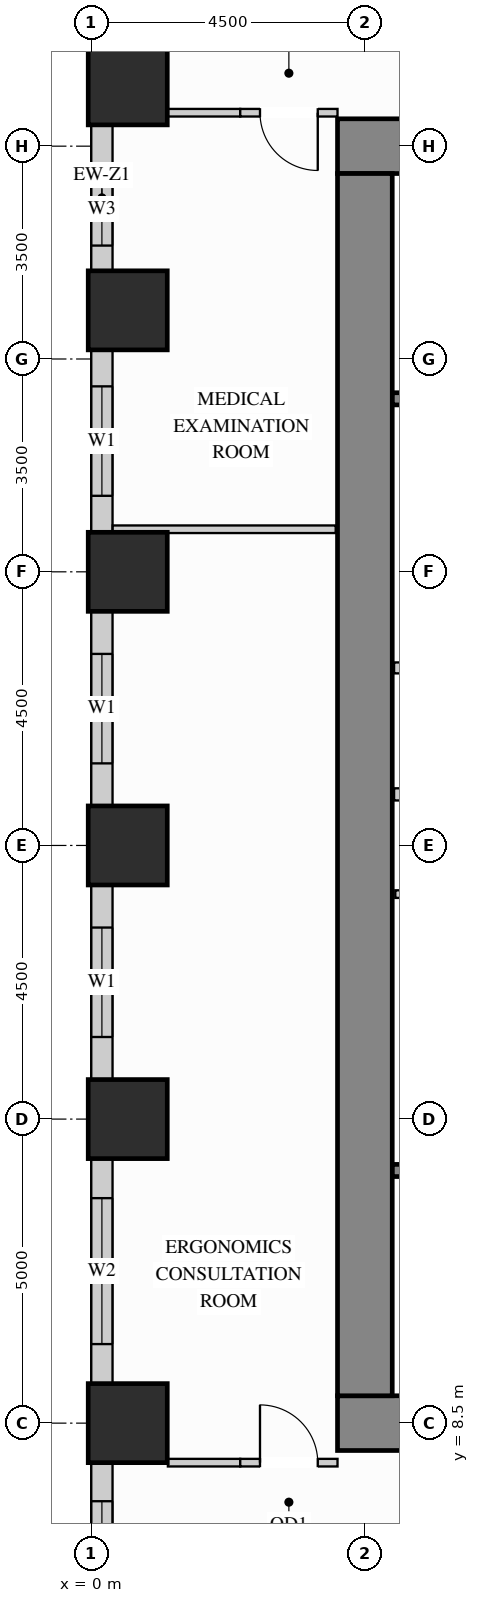
"""IFC4 building model, lengths in metres.
Left out: names, types, materials, properties, quantities, classifications, styles, units other than length and angle.
Written with IfcOpenShell. Run it as: python <this file> out.ifc"""

import sys

from ifc_helpers import new_model, si_unit, direction, frame, frame_2d, origin, origin_2d, place, context, subcontext, project, spatial, rectangle, extrude, source, transform, mapped, element, fill, save


model = new_model("IFC4")
c1 = context("Model", 3, precision=1e-05, world=origin(), true_north=direction((0.0, 1.0)))
c2 = subcontext(c1, "Body", "Model", "MODEL_VIEW")
j1 = project(units=[si_unit("LENGTHUNIT", "METRE"), si_unit("PLANEANGLEUNIT", "RADIAN")], contexts=[c1])
p1 = place(None, origin())
s1 = spatial("IfcSite", under=j1, at=p1, CompositionType="ELEMENT")
p2 = place(p1, origin())
s2 = spatial("IfcBuilding", under=s1, at=p2, CompositionType="ELEMENT")
p3 = place(p2, frame((0.0, 0.0, 33.3)))
s3 = spatial("IfcBuildingStorey", under=s2, at=p3, CompositionType="ELEMENT", Elevation=33.3)
m1 = source(origin(), c2, "Body", "SweptSolid", [
    extrude(rectangle(XDim=1.3, YDim=1.3, at=origin_2d()), origin(), (0.0, 0.0, 1.0), 3.38),
])
for number, where, z_axis, x_axis in (
    (1, (0.6, 13.5, 0.0), (0.0, 0.0, 1.0), (1.0, 0.0, 0.0)),
    (2, (0.6, 18.0, 0.0), (0.0, 0.0, 1.0), (1.0, 0.0, 0.0)),
    (3, (0.6, 22.5, 0.0), (0.0, 0.0, 1.0), (1.0, 0.0, 0.0)),
    (4, (0.6, 26.8, 0.0), (0.0, 0.0, 1.0), (1.0, 0.0, 0.0)),
    (5, (0.6, 30.5, 0.0), (0.0, 0.0, 1.0), (1.0, 0.0, 0.0)),
    (6, (0.6, 8.5, 0.0), (0.0, 0.0, 1.0), (1.0, 0.0, 0.0)),
):
    element("IfcColumn", number, at=place(p3, frame(where, z_axis=z_axis, x_axis=x_axis)), inside=s3, PredefinedType="COLUMN", context=c2, shape_type="MappedRepresentation", body=[
        mapped(m1, transform((0.0, 0.0, 0.0), x_axis=(1.0, 0.0, 0.0), y_axis=(0.0, 1.0, 0.0), z_axis=(0.0, 0.0, 1.0))),
    ])
m2 = source(origin(), c2, "Body", "SweptSolid", [
    extrude(rectangle(XDim=10.9, YDim=0.9, at=frame_2d((5.45, 0.0))), origin(), (0.0, 0.0, 1.0), 3.38),
])
for number, where, z_axis, x_axis in (
    (7, (4.05, 29.5, 0.0), (0.0, 0.0, 1.0), (1.0, 0.0, 0.0)),
    (8, (4.05, 8.5, 0.0), (0.0, 0.0, 1.0), (1.0, 0.0, 0.0)),
):
    element("IfcWall", number, at=place(p3, frame(where, z_axis=z_axis, x_axis=x_axis)), inside=s3, PredefinedType="SHEAR", context=c2, shape_type="MappedRepresentation", body=[
        mapped(m2, transform((0.0, 0.0, 0.0), x_axis=(1.0, 0.0, 0.0), y_axis=(0.0, 1.0, 0.0), z_axis=(0.0, 0.0, 1.0))),
    ])
m3 = source(origin(), c2, "Body", "SweptSolid", [
    extrude(rectangle(XDim=20.1, YDim=0.9, at=frame_2d((10.05, 0.0))), origin(), (0.0, 0.0, 1.0), 3.38),
])
p4 = place(p3, frame((4.5, 8.95, 0.0), z_axis=(0.0, 0.0, 1.0), x_axis=(0.0, 1.0, 0.0)))
e9 = element("IfcWall", 9, at=p4, inside=s3, PredefinedType="SHEAR", context=c2, shape_type="MappedRepresentation", body=[
    mapped(m3, transform((0.0, 0.0, 0.0), x_axis=(1.0, 0.0, 0.0), y_axis=(0.0, 1.0, 0.0), z_axis=(0.0, 0.0, 1.0))),
])
p5 = place(p3, frame((0.175, 29.852, 0.0), z_axis=(0.0, 0.0, 1.0), x_axis=(0.0, -1.0, 0.0)))
e10 = element("IfcWall", 10, at=p5, inside=s3, PredefinedType="SOLIDWALL", context=c2, shape_type="SweptSolid", body=[
    extrude(rectangle(XDim=2.404, YDim=0.35, at=frame_2d((1.202, 0.0))), origin(), (0.0, 0.0, 1.0), 2.51),
])
p6 = place(p5, frame((0.787, 0.0, 0.78)))
e11 = element("IfcOpeningElement", 11, at=p6, cuts=e10, PredefinedType="OPENING", context=c2, shape_type="SweptSolid", body=[
    extrude(rectangle(XDim=1.2, YDim=1.55, at=frame_2d((0.6, 0.775))), frame((0.0, 0.185, 0.0), z_axis=(0.0, -1.0, 0.0), x_axis=(1.0, 0.0, 0.0)), (0.0, 0.0, 1.0), 0.37),
])
p7 = place(p3, frame((0.175, 26.152, 0.0), z_axis=(0.0, 0.0, 1.0), x_axis=(0.0, -1.0, 0.0)))
e12 = element("IfcWall", 12, at=p7, inside=s3, PredefinedType="SOLIDWALL", context=c2, shape_type="SweptSolid", body=[
    extrude(rectangle(XDim=3.004, YDim=0.35, at=frame_2d((1.502, 0.0))), origin(), (0.0, 0.0, 1.0), 2.51),
])
p8 = place(p7, frame((0.602, 0.0, 0.78)))
e13 = element("IfcOpeningElement", 13, at=p8, cuts=e12, PredefinedType="OPENING", context=c2, shape_type="SweptSolid", body=[
    extrude(rectangle(XDim=1.8, YDim=1.55, at=frame_2d((0.9, 0.775))), frame((0.0, 0.185, 0.0), z_axis=(0.0, -1.0, 0.0), x_axis=(1.0, 0.0, 0.0)), (0.0, 0.0, 1.0), 0.37),
])
p9 = place(p3, frame((0.175, 21.852, 0.0), z_axis=(0.0, 0.0, 1.0), x_axis=(0.0, -1.0, 0.0)))
e14 = element("IfcWall", 14, at=p9, inside=s3, PredefinedType="SOLIDWALL", context=c2, shape_type="SweptSolid", body=[
    extrude(rectangle(XDim=3.204, YDim=0.35, at=frame_2d((1.602, 0.0))), origin(), (0.0, 0.0, 1.0), 2.51),
])
p10 = place(p9, frame((0.702, 0.0, 0.78)))
e15 = element("IfcOpeningElement", 15, at=p10, cuts=e14, PredefinedType="OPENING", context=c2, shape_type="SweptSolid", body=[
    extrude(rectangle(XDim=1.8, YDim=1.55, at=frame_2d((0.9, 0.775))), frame((0.0, 0.185, 0.0), z_axis=(0.0, -1.0, 0.0), x_axis=(1.0, 0.0, 0.0)), (0.0, 0.0, 1.0), 0.37),
])
p11 = place(p3, frame((0.175, 17.352, 0.0), z_axis=(0.0, 0.0, 1.0), x_axis=(0.0, -1.0, 0.0)))
e16 = element("IfcWall", 16, at=p11, inside=s3, PredefinedType="SOLIDWALL", context=c2, shape_type="SweptSolid", body=[
    extrude(rectangle(XDim=3.204, YDim=0.35, at=frame_2d((1.602, 0.0))), origin(), (0.0, 0.0, 1.0), 2.51),
])
p12 = place(p11, frame((0.702, 0.0, 0.78)))
e17 = element("IfcOpeningElement", 17, at=p12, cuts=e16, PredefinedType="OPENING", context=c2, shape_type="SweptSolid", body=[
    extrude(rectangle(XDim=1.8, YDim=1.55, at=frame_2d((0.9, 0.775))), frame((0.0, 0.185, 0.0), z_axis=(0.0, -1.0, 0.0), x_axis=(1.0, 0.0, 0.0)), (0.0, 0.0, 1.0), 0.37),
])
p13 = place(p3, frame((0.175, 12.852, 0.0), z_axis=(0.0, 0.0, 1.0), x_axis=(0.0, -1.0, 0.0)))
e18 = element("IfcWall", 18, at=p13, inside=s3, PredefinedType="SOLIDWALL", context=c2, shape_type="SweptSolid", body=[
    extrude(rectangle(XDim=3.704, YDim=0.35, at=frame_2d((1.852, 0.0))), origin(), (0.0, 0.0, 1.0), 2.51),
])
p14 = place(p13, frame((0.652, 0.0, 0.78)))
e19 = element("IfcOpeningElement", 19, at=p14, cuts=e18, PredefinedType="OPENING", context=c2, shape_type="SweptSolid", body=[
    extrude(rectangle(XDim=2.4, YDim=1.55, at=frame_2d((1.2, 0.775))), frame((0.0, 0.185, 0.0), z_axis=(0.0, -1.0, 0.0), x_axis=(1.0, 0.0, 0.0)), (0.0, 0.0, 1.0), 0.37),
])
p15 = place(p3, frame((0.175, 7.852, 0.0), z_axis=(0.0, 0.0, 1.0), x_axis=(0.0, -1.0, 0.0)))
e20 = element("IfcWall", 20, at=p15, inside=s3, PredefinedType="SOLIDWALL", context=c2, shape_type="SweptSolid", body=[
    extrude(rectangle(XDim=3.704, YDim=0.35, at=frame_2d((1.852, 0.0))), origin(), (0.0, 0.0, 1.0), 2.51),
])
p16 = place(p15, frame((0.636, 0.0, 0.78)))
e21 = element("IfcOpeningElement", 21, at=p16, cuts=e20, PredefinedType="OPENING", context=c2, shape_type="SweptSolid", body=[
    extrude(rectangle(XDim=1.8, YDim=1.55, at=frame_2d((0.9, 0.775))), frame((0.0, 0.185, 0.0), z_axis=(0.0, -1.0, 0.0), x_axis=(1.0, 0.0, 0.0)), (0.0, 0.0, 1.0), 0.37),
])
m4 = source(origin(), c2, "Body", "SweptSolid", [
    extrude(rectangle(XDim=2.17, YDim=0.18, at=frame_2d((1.085, 0.0))), origin(), (0.0, 0.0, 1.0), 3.365),
])
p17 = place(p3, frame((4.98, 20.92, 0.0), z_axis=(0.0, 0.0, 1.0), x_axis=(1.0, 0.0, 0.0)))
e22 = element("IfcWall", 22, at=p17, inside=s3, PredefinedType="PARTITIONING", context=c2, shape_type="MappedRepresentation", body=[
    mapped(m4, transform((0.0, 0.0, 0.0), x_axis=(1.0, 0.0, 0.0), y_axis=(0.0, 1.0, 0.0), z_axis=(0.0, 0.0, 1.0))),
])
p18 = place(p3, frame((5.0, 17.2, 0.0), z_axis=(0.0, 0.0, 1.0), x_axis=(1.0, 0.0, 0.0)))
e23 = element("IfcWall", 23, at=p18, inside=s3, PredefinedType="PARTITIONING", context=c2, shape_type="SweptSolid", body=[
    extrude(rectangle(XDim=2.4, YDim=0.125, at=frame_2d((1.2, 0.0))), origin(), (0.0, 0.0, 1.0), 3.365),
])
p19 = place(p18, frame((0.7, 0.0, 0.0)))
e24 = element("IfcOpeningElement", 24, at=p19, cuts=e23, PredefinedType="OPENING", context=c2, shape_type="SweptSolid", body=[
    extrude(rectangle(XDim=0.85, YDim=2.1, at=frame_2d((0.425, 1.05))), frame((0.0, 0.073, 0.0), z_axis=(0.0, -1.0, 0.0), x_axis=(1.0, 0.0, 0.0)), (0.0, 0.0, 1.0), 0.145),
])
m5 = source(origin(), c2, "Body", "SweptSolid", [
    extrude(rectangle(XDim=1.19, YDim=0.125, at=frame_2d((0.595, 0.0))), origin(), (0.0, 0.0, 1.0), 3.365),
])
p20 = place(p3, frame((1.26, 30.05, 0.0), z_axis=(0.0, 0.0, 1.0), x_axis=(1.0, 0.0, 0.0)))
e25 = element("IfcWall", 25, at=p20, inside=s3, PredefinedType="PARTITIONING", context=c2, shape_type="MappedRepresentation", body=[
    mapped(m5, transform((0.0, 0.0, 0.0), x_axis=(1.0, 0.0, 0.0), y_axis=(0.0, 1.0, 0.0), z_axis=(0.0, 0.0, 1.0))),
])
p21 = place(p3, frame((2.45, 30.05, 0.0), z_axis=(0.0, 0.0, 1.0), x_axis=(1.0, 0.0, 0.0)))
e26 = element("IfcWall", 26, at=p21, inside=s3, PredefinedType="PARTITIONING", context=c2, shape_type="SweptSolid", body=[
    extrude(rectangle(XDim=1.6, YDim=0.125, at=frame_2d((0.8, 0.0))), origin(), (0.0, 0.0, 1.0), 3.365),
])
p22 = place(p21, frame((0.325, 0.0, 0.0)))
e27 = element("IfcOpeningElement", 27, at=p22, cuts=e26, PredefinedType="OPENING", context=c2, shape_type="SweptSolid", body=[
    extrude(rectangle(XDim=0.95, YDim=2.15, at=frame_2d((0.475, 1.075))), frame((0.0, 0.073, 0.0), z_axis=(0.0, -1.0, 0.0), x_axis=(1.0, 0.0, 0.0)), (0.0, 0.0, 1.0), 0.145),
])
p23 = place(p3, frame((1.26, 7.85, 0.0), z_axis=(0.0, 0.0, 1.0), x_axis=(1.0, 0.0, 0.0)))
e28 = element("IfcWall", 28, at=p23, inside=s3, PredefinedType="PARTITIONING", context=c2, shape_type="MappedRepresentation", body=[
    mapped(m5, transform((0.0, 0.0, 0.0), x_axis=(1.0, 0.0, 0.0), y_axis=(0.0, 1.0, 0.0), z_axis=(0.0, 0.0, 1.0))),
])
p24 = place(p3, frame((2.45, 7.85, 0.0), z_axis=(0.0, 0.0, 1.0), x_axis=(1.0, 0.0, 0.0)))
e29 = element("IfcWall", 29, at=p24, inside=s3, PredefinedType="PARTITIONING", context=c2, shape_type="SweptSolid", body=[
    extrude(rectangle(XDim=1.6, YDim=0.125, at=frame_2d((0.8, 0.0))), origin(), (0.0, 0.0, 1.0), 3.365),
])
p25 = place(p24, frame((0.325, 0.0, 0.0)))
e30 = element("IfcOpeningElement", 30, at=p25, cuts=e29, PredefinedType="OPENING", context=c2, shape_type="SweptSolid", body=[
    extrude(rectangle(XDim=0.95, YDim=2.15, at=frame_2d((0.475, 1.075))), frame((0.0, 0.073, 0.0), z_axis=(0.0, -1.0, 0.0), x_axis=(1.0, 0.0, 0.0)), (0.0, 0.0, 1.0), 0.145),
])
m6 = source(origin(), c2, "Body", "SweptSolid", [
    extrude(rectangle(XDim=3.668, YDim=0.125, at=frame_2d((1.834, 0.0))), origin(), (0.0, 0.0, 1.0), 3.365),
])
p26 = place(p3, frame((0.352, 23.2, 0.0), z_axis=(0.0, 0.0, 1.0), x_axis=(1.0, 0.0, 0.0)))
e31 = element("IfcWall", 31, at=p26, inside=s3, PredefinedType="PARTITIONING", context=c2, shape_type="MappedRepresentation", body=[
    mapped(m6, transform((0.0, 0.0, 0.0), x_axis=(1.0, 0.0, 0.0), y_axis=(0.0, 1.0, 0.0), z_axis=(0.0, 0.0, 1.0))),
])
m7 = source(origin(), c2, "Body", "SweptSolid", [
    extrude(rectangle(XDim=2.09, YDim=0.2, at=frame_2d((1.045, 0.0))), origin(), (0.0, 0.0, 1.0), 3.365),
])
p27 = place(p3, frame((4.98, 18.84, 0.0), z_axis=(0.0, 0.0, 1.0), x_axis=(1.0, 0.0, 0.0)))
e32 = element("IfcWall", 32, at=p27, inside=s3, PredefinedType="PARTITIONING", context=c2, shape_type="MappedRepresentation", body=[
    mapped(m7, transform((0.0, 0.0, 0.0), x_axis=(1.0, 0.0, 0.0), y_axis=(0.0, 1.0, 0.0), z_axis=(0.0, 0.0, 1.0))),
])
p28 = place(p3, frame((4.952, 12.655, 0.0), z_axis=(0.0, 0.0, 1.0), x_axis=(1.0, 0.0, 0.0)))
e33 = element("IfcWall", 33, at=p28, inside=s3, PredefinedType="SHEAR", context=c2, shape_type="SweptSolid", body=[
    extrude(rectangle(XDim=7.453, YDim=0.2, at=frame_2d((3.727, 0.0))), origin(), (0.0, 0.0, 1.0), 3.38),
])
p29 = place(p28, frame((0.4, 0.0, 0.0)))
e34 = element("IfcOpeningElement", 34, at=p29, cuts=e33, PredefinedType="OPENING", context=c2, shape_type="SweptSolid", body=[
    extrude(rectangle(XDim=1.1, YDim=2.15, at=frame_2d((0.55, 1.075))), frame((0.0, 0.11, 0.0), z_axis=(0.0, -1.0, 0.0), x_axis=(1.0, 0.0, 0.0)), (0.0, 0.0, 1.0), 0.22),
])
p30 = place(p3, frame((4.952, 25.345, 0.0), z_axis=(0.0, 0.0, 1.0), x_axis=(1.0, 0.0, 0.0)))
e35 = element("IfcWall", 35, at=p30, inside=s3, PredefinedType="SHEAR", context=c2, shape_type="SweptSolid", body=[
    extrude(rectangle(XDim=7.453, YDim=0.2, at=frame_2d((3.727, 0.0))), origin(), (0.0, 0.0, 1.0), 3.38),
])
p31 = place(p30, frame((0.4, 0.0, 0.0)))
e36 = element("IfcOpeningElement", 36, at=p31, cuts=e35, PredefinedType="OPENING", context=c2, shape_type="SweptSolid", body=[
    extrude(rectangle(XDim=1.1, YDim=2.15, at=frame_2d((0.55, 1.075))), frame((0.0, 0.11, 0.0), z_axis=(0.0, -1.0, 0.0), x_axis=(1.0, 0.0, 0.0)), (0.0, 0.0, 1.0), 0.22),
])
m8 = source(origin(), c2, "Body", "SweptSolid", [
    extrude(rectangle(XDim=0.95, YDim=2.15, at=frame_2d((0.475, 1.075))), frame((0.0, 0.025, 0.0), z_axis=(0.0, -1.0, 0.0), x_axis=(1.0, 0.0, 0.0)), (0.0, 0.0, 1.0), 0.05),
])
p32 = place(p25, origin())
e37 = element("IfcDoor", 37, at=p32, inside=s3, OperationType="SINGLE_SWING_LEFT", PredefinedType="DOOR", context=c2, shape_type="MappedRepresentation", body=[
    mapped(m8, transform((0.0, 0.0, 0.0), x_axis=(1.0, 0.0, 0.0), y_axis=(0.0, 1.0, 0.0), z_axis=(0.0, 0.0, 1.0))),
])
fill(e30, e37)
p33 = place(p22, origin())
e38 = element("IfcDoor", 38, at=p33, inside=s3, OperationType="SINGLE_SWING_RIGHT", PredefinedType="DOOR", context=c2, shape_type="MappedRepresentation", body=[
    mapped(m8, transform((0.0, 0.0, 0.0), x_axis=(1.0, 0.0, 0.0), y_axis=(0.0, 1.0, 0.0), z_axis=(0.0, 0.0, 1.0))),
])
fill(e27, e38)
m9 = source(origin(), c2, "Body", "SweptSolid", [
    extrude(rectangle(XDim=1.8, YDim=1.55, at=frame_2d((0.9, 0.775))), frame((0.0, 0.03, 0.0), z_axis=(0.0, -1.0, 0.0), x_axis=(1.0, 0.0, 0.0)), (0.0, 0.0, 1.0), 0.06),
])
p34 = place(p8, origin())
e39 = element("IfcWindow", 39, at=p34, inside=s3, PartitioningType="SINGLE_PANEL", PredefinedType="WINDOW", context=c2, shape_type="MappedRepresentation", body=[
    mapped(m9, transform((0.0, 0.0, 0.0), x_axis=(1.0, 0.0, 0.0), y_axis=(0.0, 1.0, 0.0), z_axis=(0.0, 0.0, 1.0))),
])
fill(e13, e39)
p35 = place(p10, origin())
e40 = element("IfcWindow", 40, at=p35, inside=s3, PartitioningType="SINGLE_PANEL", PredefinedType="WINDOW", context=c2, shape_type="MappedRepresentation", body=[
    mapped(m9, transform((0.0, 0.0, 0.0), x_axis=(1.0, 0.0, 0.0), y_axis=(0.0, 1.0, 0.0), z_axis=(0.0, 0.0, 1.0))),
])
fill(e15, e40)
p36 = place(p12, origin())
e41 = element("IfcWindow", 41, at=p36, inside=s3, PartitioningType="SINGLE_PANEL", PredefinedType="WINDOW", context=c2, shape_type="MappedRepresentation", body=[
    mapped(m9, transform((0.0, 0.0, 0.0), x_axis=(1.0, 0.0, 0.0), y_axis=(0.0, 1.0, 0.0), z_axis=(0.0, 0.0, 1.0))),
])
fill(e17, e41)
p37 = place(p16, origin())
e42 = element("IfcWindow", 42, at=p37, inside=s3, PartitioningType="SINGLE_PANEL", PredefinedType="WINDOW", context=c2, shape_type="MappedRepresentation", body=[
    mapped(m9, transform((0.0, 0.0, 0.0), x_axis=(1.0, 0.0, 0.0), y_axis=(0.0, 1.0, 0.0), z_axis=(0.0, 0.0, 1.0))),
])
fill(e21, e42)
m10 = source(origin(), c2, "Body", "SweptSolid", [
    extrude(rectangle(XDim=2.4, YDim=1.55, at=frame_2d((1.2, 0.775))), frame((0.0, 0.03, 0.0), z_axis=(0.0, -1.0, 0.0), x_axis=(1.0, 0.0, 0.0)), (0.0, 0.0, 1.0), 0.06),
])
p38 = place(p14, origin())
e43 = element("IfcWindow", 43, at=p38, inside=s3, PartitioningType="SINGLE_PANEL", PredefinedType="WINDOW", context=c2, shape_type="MappedRepresentation", body=[
    mapped(m10, transform((0.0, 0.0, 0.0), x_axis=(1.0, 0.0, 0.0), y_axis=(0.0, 1.0, 0.0), z_axis=(0.0, 0.0, 1.0))),
])
fill(e19, e43)
m11 = source(origin(), c2, "Body", "SweptSolid", [
    extrude(rectangle(XDim=1.2, YDim=1.55, at=frame_2d((0.6, 0.775))), frame((0.0, 0.03, 0.0), z_axis=(0.0, -1.0, 0.0), x_axis=(1.0, 0.0, 0.0)), (0.0, 0.0, 1.0), 0.06),
])
p39 = place(p6, origin())
e44 = element("IfcWindow", 44, at=p39, inside=s3, PartitioningType="SINGLE_PANEL", PredefinedType="WINDOW", context=c2, shape_type="MappedRepresentation", body=[
    mapped(m11, transform((0.0, 0.0, 0.0), x_axis=(1.0, 0.0, 0.0), y_axis=(0.0, 1.0, 0.0), z_axis=(0.0, 0.0, 1.0))),
])
fill(e11, e44)
save(model, sys.argv[1])
